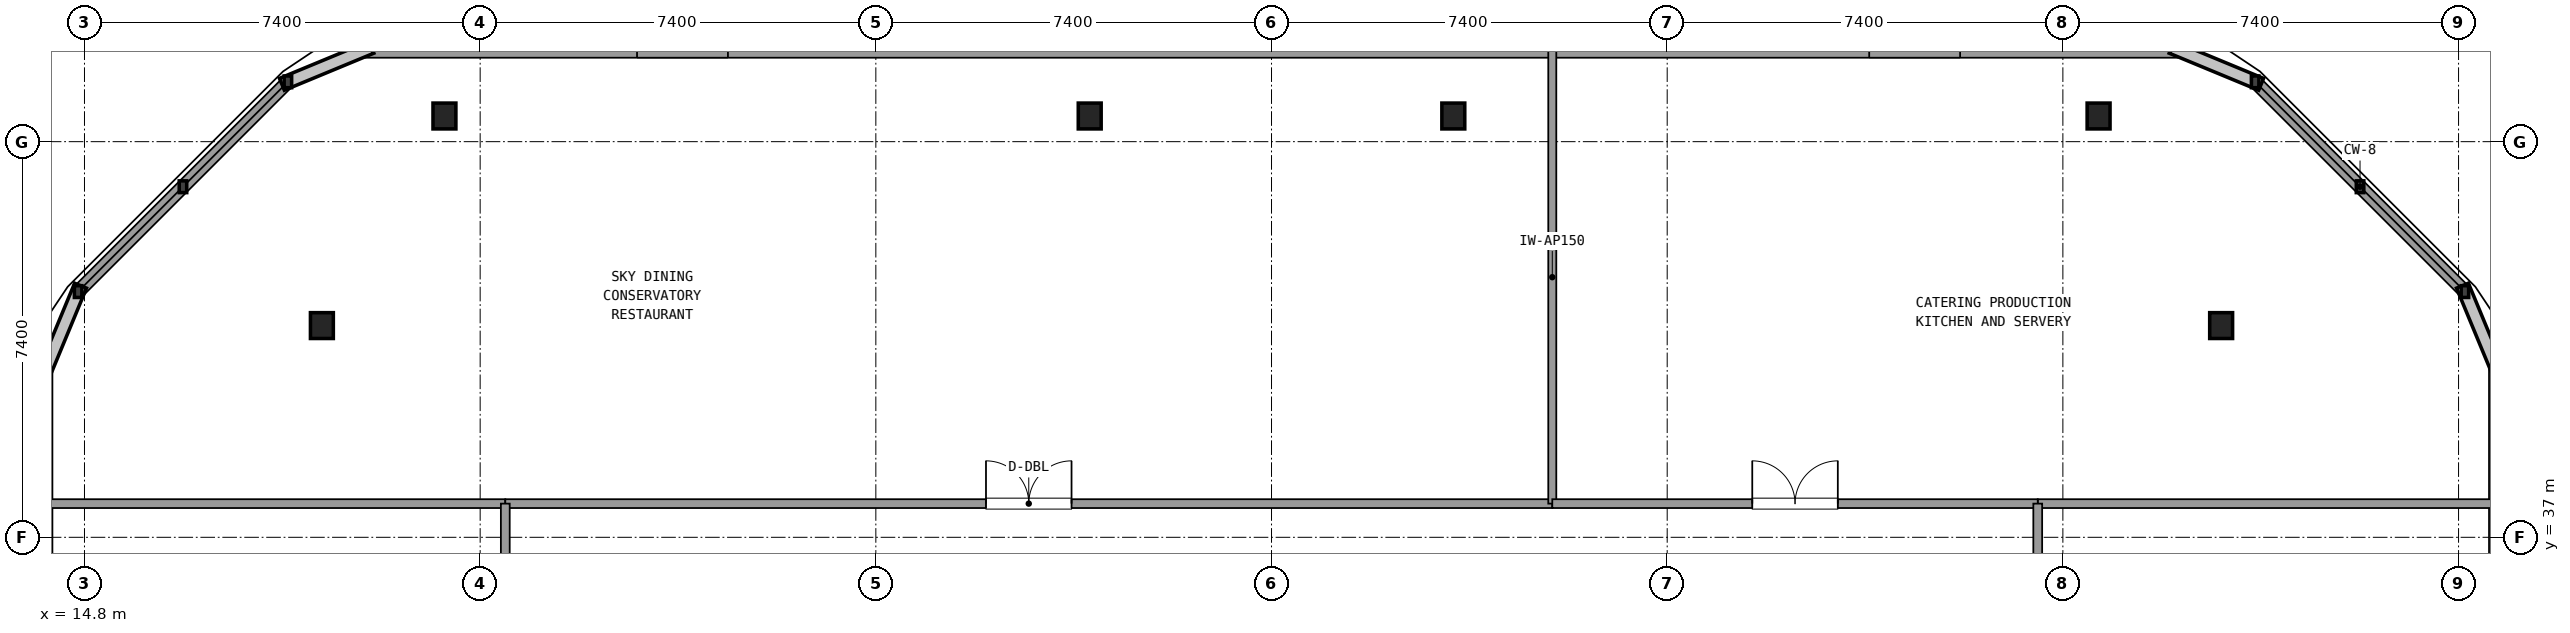
"""IFC4 building model, lengths in metres.
Left out: names, types, materials, properties, quantities, classifications, styles, units other than length and angle.
Written with IfcOpenShell. Run it as: python <this file> out.ifc"""

import sys

from ifc_helpers import new_model, si_unit, direction, frame, frame_2d, origin, origin_2d, place, context, subcontext, project, spatial, rectangle, i_section, extrude, element, fill, save


model = new_model("IFC4")
c1 = context("Model", 3, precision=1e-05, world=origin(), true_north=direction((0.0, 1.0)))
c2 = subcontext(c1, "Body", "Model", "MODEL_VIEW")
j1 = project(units=[si_unit("LENGTHUNIT", "METRE"), si_unit("PLANEANGLEUNIT", "RADIAN")], contexts=[c1])
p1 = place(None, origin())
s1 = spatial("IfcSite", under=j1, at=p1, CompositionType="ELEMENT")
p2 = place(p1, origin())
s2 = spatial("IfcBuilding", under=s1, at=p2, CompositionType="ELEMENT")
p3 = place(p2, frame((0.0, 0.0, 290.34)))
s3 = spatial("IfcBuildingStorey", under=s2, at=p3, CompositionType="ELEMENT", Elevation=290.34)
for number, where, z_axis, x_axis in (
    (1, (54.76, 40.96, 0.0), (0.0, 0.0, 1.0), (1.0, 0.0, 0.0)),
    (2, (52.468, 44.88, 0.0), (0.0, 0.0, 1.0), (1.0, 0.0, 0.0)),
    (3, (40.4, 44.88, 0.0), (0.0, 0.0, 1.0), (1.0, 0.0, 0.0)),
    (4, (33.6, 44.88, 0.0), (0.0, 0.0, 1.0), (1.0, 0.0, 0.0)),
    (5, (21.532, 44.88, 0.0), (0.0, 0.0, 1.0), (1.0, 0.0, 0.0)),
    (6, (19.24, 40.96, 0.0), (0.0, 0.0, 1.0), (1.0, 0.0, 0.0)),
):
    element("IfcColumn", number, at=place(p3, frame(where, z_axis=z_axis, x_axis=x_axis)), inside=s3, PredefinedType="COLUMN", context=c2, shape_type="SweptSolid", body=[
        extrude(i_section(OverallWidth=0.428, OverallDepth=0.483, WebThickness=0.042, FlangeThickness=0.068, at=origin_2d()), origin(), (0.0, 0.0, 1.0), 4.32),
    ])
p4 = place(p3, frame((59.92, 11.655, 0.0), z_axis=(0.0, 0.0, 1.0), x_axis=(0.0, 1.0, 0.0)))
e7 = element("IfcWall", 7, at=p4, inside=s3, PredefinedType="SOLIDWALL", context=c2, shape_type="SweptSolid", body=[
    extrude(rectangle(XDim=28.49, YDim=0.3, at=frame_2d((14.245, 0.0))), origin(), (0.0, 0.0, 1.0), 3.46),
])
p5 = place(p4, frame((7.122, 0.0, 0.85)))
e8 = element("IfcOpeningElement", 8, at=p5, cuts=e7, PredefinedType="OPENING", context=c2, shape_type="SweptSolid", body=[
    extrude(rectangle(XDim=1.9, YDim=1.7, at=frame_2d((0.95, 0.85))), frame((0.0, 0.16, 0.0), z_axis=(0.0, -1.0, 0.0), x_axis=(1.0, 0.0, 0.0)), (0.0, 0.0, 1.0), 0.32),
])
p6 = place(p4, frame((18.518, 0.0, 0.85)))
e9 = element("IfcOpeningElement", 9, at=p6, cuts=e7, PredefinedType="OPENING", context=c2, shape_type="SweptSolid", body=[
    extrude(rectangle(XDim=1.9, YDim=1.7, at=frame_2d((0.95, 0.85))), frame((0.0, 0.16, 0.0), z_axis=(0.0, -1.0, 0.0), x_axis=(1.0, 0.0, 0.0)), (0.0, 0.0, 1.0), 0.32),
])
p7 = place(p3, frame((59.319, 41.596, 0.0), z_axis=(0.0, 0.0, 1.0), x_axis=(-0.707106781187, 0.707106781187, 0.0)))
e10 = element("IfcWall", 10, at=p7, inside=s3, PredefinedType="SOLIDWALL", context=c2, shape_type="SweptSolid", body=[
    extrude(rectangle(XDim=5.548, YDim=0.24, at=frame_2d((2.774, 0.0))), origin(), (0.0, 0.0, 1.0), 0.85),
])
p8 = place(p3, frame((53.945, 46.12, 0.0), z_axis=(0.0, 0.0, 1.0), x_axis=(-1.0, 0.0, 0.0)))
e11 = element("IfcWall", 11, at=p8, inside=s3, PredefinedType="SOLIDWALL", context=c2, shape_type="SweptSolid", body=[
    extrude(rectangle(XDim=33.89, YDim=0.3, at=frame_2d((16.945, 0.0))), origin(), (0.0, 0.0, 1.0), 3.46),
])
p9 = place(p8, frame((4.067, 0.0, 0.85)))
e12 = element("IfcOpeningElement", 12, at=p9, cuts=e11, PredefinedType="OPENING", context=c2, shape_type="SweptSolid", body=[
    extrude(rectangle(XDim=1.7, YDim=1.75, at=frame_2d((0.85, 0.875))), frame((0.0, 0.16, 0.0), z_axis=(0.0, -1.0, 0.0), x_axis=(1.0, 0.0, 0.0)), (0.0, 0.0, 1.0), 0.32),
])
p10 = place(p8, frame((27.111, 0.0, 0.85)))
e13 = element("IfcOpeningElement", 13, at=p10, cuts=e11, PredefinedType="OPENING", context=c2, shape_type="SweptSolid", body=[
    extrude(rectangle(XDim=1.7, YDim=1.75, at=frame_2d((0.85, 0.875))), frame((0.0, 0.16, 0.0), z_axis=(0.0, -1.0, 0.0), x_axis=(1.0, 0.0, 0.0)), (0.0, 0.0, 1.0), 0.32),
])
p11 = place(p3, frame((18.604, 45.519, 0.0), z_axis=(0.0, 0.0, 1.0), x_axis=(-0.707106781187, -0.707106781187, 0.0)))
e14 = element("IfcWall", 14, at=p11, inside=s3, PredefinedType="SOLIDWALL", context=c2, shape_type="SweptSolid", body=[
    extrude(rectangle(XDim=5.548, YDim=0.24, at=frame_2d((2.774, 0.0))), origin(), (0.0, 0.0, 1.0), 0.85),
])
p12 = place(p3, frame((14.08, 40.145, 0.0), z_axis=(0.0, 0.0, 1.0), x_axis=(0.0, -1.0, 0.0)))
e15 = element("IfcWall", 15, at=p12, inside=s3, PredefinedType="SOLIDWALL", context=c2, shape_type="SweptSolid", body=[
    extrude(rectangle(XDim=9.595, YDim=0.24, at=frame_2d((4.797, 0.0))), origin(), (0.0, 0.0, 1.0), 0.85),
])
for number, where, z_axis, x_axis in (
    (16, (14.1, 37.63, 0.0), (0.0, 0.0, 1.0), (1.0, 0.0, 0.0)),
    (17, (51.33, 37.63, 0.0), (0.0, 0.0, 1.0), (1.0, 0.0, 0.0)),
):
    element("IfcWall", number, at=place(p3, frame(where, z_axis=z_axis, x_axis=x_axis)), inside=s3, PredefinedType="PARTITIONING", context=c2, shape_type="SweptSolid", body=[
        extrude(rectangle(XDim=8.57, YDim=0.165, at=frame_2d((4.285, 0.0))), origin(), (0.0, 0.0, 1.0), 2.93),
    ])
p13 = place(p3, frame((22.67, 37.63, 0.0), z_axis=(0.0, 0.0, 1.0), x_axis=(1.0, 0.0, 0.0)))
e18 = element("IfcWall", 18, at=p13, inside=s3, PredefinedType="PARTITIONING", context=c2, shape_type="SweptSolid", body=[
    extrude(rectangle(XDim=19.581, YDim=0.165, at=frame_2d((9.791, 0.0))), origin(), (0.0, 0.0, 1.0), 2.93),
])
p14 = place(p13, frame((8.99, 0.0, 0.0)))
e19 = element("IfcOpeningElement", 19, at=p14, cuts=e18, PredefinedType="OPENING", context=c2, shape_type="SweptSolid", body=[
    extrude(rectangle(XDim=1.6, YDim=2.2, at=frame_2d((0.8, 1.1))), frame((0.0, 0.093, 0.0), z_axis=(0.0, -1.0, 0.0), x_axis=(1.0, 0.0, 0.0)), (0.0, 0.0, 1.0), 0.185),
])
p15 = place(p3, frame((42.251, 37.63, 0.0), z_axis=(0.0, 0.0, 1.0), x_axis=(0.0, 1.0, 0.0)))
e20 = element("IfcWall", 20, at=p15, inside=s3, PredefinedType="PARTITIONING", context=c2, shape_type="SweptSolid", body=[
    extrude(rectangle(XDim=8.47, YDim=0.15, at=frame_2d((4.235, 0.0))), origin(), (0.0, 0.0, 1.0), 2.93),
])
p16 = place(p3, frame((42.251, 37.63, 0.0), z_axis=(0.0, 0.0, 1.0), x_axis=(1.0, 0.0, 0.0)))
e21 = element("IfcWall", 21, at=p16, inside=s3, PredefinedType="PARTITIONING", context=c2, shape_type="SweptSolid", body=[
    extrude(rectangle(XDim=9.079, YDim=0.165, at=frame_2d((4.54, 0.0))), origin(), (0.0, 0.0, 1.0), 2.93),
])
p17 = place(p16, frame((3.74, 0.0, 0.0)))
e22 = element("IfcOpeningElement", 22, at=p17, cuts=e21, PredefinedType="OPENING", context=c2, shape_type="SweptSolid", body=[
    extrude(rectangle(XDim=1.6, YDim=2.2, at=frame_2d((0.8, 1.1))), frame((0.0, 0.093, 0.0), z_axis=(0.0, -1.0, 0.0), x_axis=(1.0, 0.0, 0.0)), (0.0, 0.0, 1.0), 0.185),
])
p18 = place(p3, frame((22.67, 14.17, 0.0), z_axis=(0.0, 0.0, 1.0), x_axis=(0.0, 1.0, 0.0)))
e23 = element("IfcWall", 23, at=p18, inside=s3, PredefinedType="PARTITIONING", context=c2, shape_type="SweptSolid", body=[
    extrude(rectangle(XDim=23.46, YDim=0.165, at=frame_2d((11.73, 0.0))), origin(), (0.0, 0.0, 1.0), 2.93),
])
p19 = place(p18, frame((10.93, 0.0, 0.0)))
e24 = element("IfcOpeningElement", 24, at=p19, cuts=e23, PredefinedType="OPENING", context=c2, shape_type="SweptSolid", body=[
    extrude(rectangle(XDim=1.6, YDim=2.2, at=frame_2d((0.8, 1.1))), frame((0.0, 0.093, 0.0), z_axis=(0.0, -1.0, 0.0), x_axis=(1.0, 0.0, 0.0)), (0.0, 0.0, 1.0), 0.185),
])
p20 = place(p3, frame((51.33, 14.17, 0.0), z_axis=(0.0, 0.0, 1.0), x_axis=(0.0, 1.0, 0.0)))
e25 = element("IfcWall", 25, at=p20, inside=s3, PredefinedType="PARTITIONING", context=c2, shape_type="SweptSolid", body=[
    extrude(rectangle(XDim=23.46, YDim=0.165, at=frame_2d((11.73, 0.0))), origin(), (0.0, 0.0, 1.0), 2.93),
])
p21 = place(p20, frame((10.93, 0.0, 0.0)))
e26 = element("IfcOpeningElement", 26, at=p21, cuts=e25, PredefinedType="OPENING", context=c2, shape_type="SweptSolid", body=[
    extrude(rectangle(XDim=1.6, YDim=2.2, at=frame_2d((0.8, 1.1))), frame((0.0, 0.093, 0.0), z_axis=(0.0, -1.0, 0.0), x_axis=(1.0, 0.0, 0.0)), (0.0, 0.0, 1.0), 0.185),
])
p22 = place(p14, origin())
e27 = element("IfcDoor", 27, at=p22, inside=s3, OperationType="DOUBLE_DOOR_SINGLE_SWING", PredefinedType="DOOR", context=c2, shape_type="SweptSolid", body=[
    extrude(rectangle(XDim=1.6, YDim=2.2, at=frame_2d((0.8, 1.1))), frame((0.0, 0.025, 0.0), z_axis=(0.0, -1.0, 0.0), x_axis=(1.0, 0.0, 0.0)), (0.0, 0.0, 1.0), 0.05),
])
fill(e19, e27)
p23 = place(p17, origin())
e28 = element("IfcDoor", 28, at=p23, inside=s3, OperationType="DOUBLE_DOOR_SINGLE_SWING", PredefinedType="DOOR", context=c2, shape_type="SweptSolid", body=[
    extrude(rectangle(XDim=1.6, YDim=2.2, at=frame_2d((0.8, 1.1))), frame((0.0, 0.025, 0.0), z_axis=(0.0, -1.0, 0.0), x_axis=(1.0, 0.0, 0.0)), (0.0, 0.0, 1.0), 0.05),
])
fill(e22, e28)
save(model, sys.argv[1])
